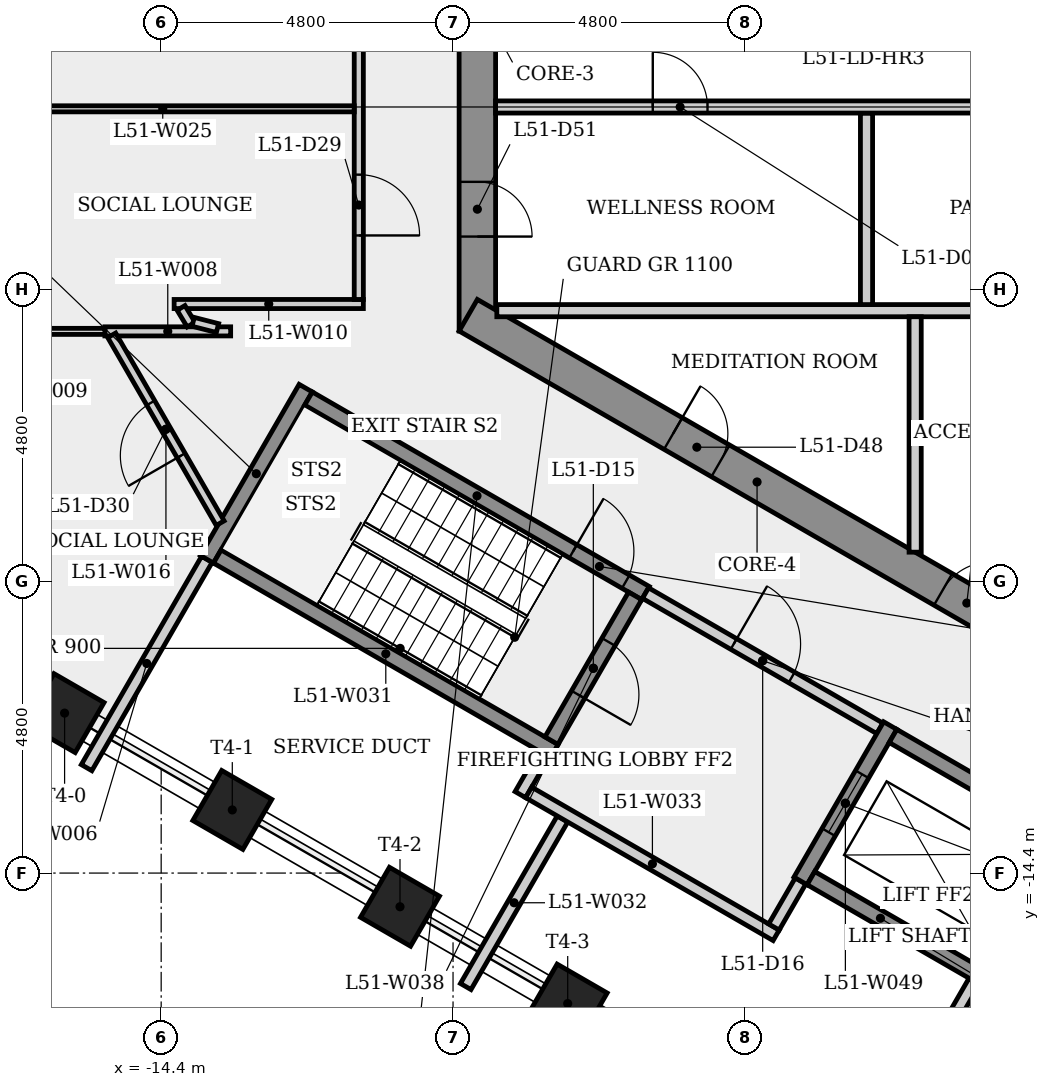
"""IFC4 building model, lengths in metres.
Left out: names, types, materials, properties, quantities, classifications, styles, units other than length and angle.
Written with IfcOpenShell. Run it as: python <this file> out.ifc"""

import sys

from ifc_helpers import new_model, si_unit, direction, frame, frame_2d, origin, origin_2d, place, context, subcontext, project, spatial, rectangle, extrude, element, fill, save


model = new_model("IFC4")
c1 = context("Model", 3, precision=1e-05, world=origin(), true_north=direction((0.0, 1.0)))
c2 = subcontext(c1, "Body", "Model", "MODEL_VIEW")
j1 = project(units=[si_unit("LENGTHUNIT", "METRE"), si_unit("PLANEANGLEUNIT", "RADIAN")], contexts=[c1])
p1 = place(None, origin())
s1 = spatial("IfcSite", under=j1, at=p1, CompositionType="ELEMENT")
p2 = place(p1, origin())
s2 = spatial("IfcBuilding", under=s1, at=p2, CompositionType="ELEMENT")
p3 = place(p2, frame((0.0, 0.0, 190.7)))
s3 = spatial("IfcBuildingStorey", under=s2, at=p3, CompositionType="ELEMENT", Elevation=190.7)
p4 = place(p3, frame((-9.2, 5.485, 0.0), z_axis=(0.0, 0.0, 1.0), x_axis=(0.0, -1.0, 0.0)))
e1 = element("IfcWall", 1, at=p4, inside=s3, PredefinedType="SHEAR", context=c2, shape_type="SweptSolid", body=[
    extrude(rectangle(XDim=10.97, YDim=0.6, at=frame_2d((5.485, 0.0))), origin(), (0.0, 0.0, 1.0), 4.0),
])
p5 = place(p4, frame((8.516, 0.0, 0.0)))
e2 = element("IfcOpeningElement", 2, at=p5, cuts=e1, PredefinedType="OPENING", context=c2, shape_type="SweptSolid", body=[
    extrude(rectangle(XDim=0.9, YDim=2.1, at=frame_2d((0.45, 1.05))), frame((0.0, 0.31, 0.0), z_axis=(0.0, -1.0, 0.0), x_axis=(1.0, 0.0, 0.0)), (0.0, 0.0, 1.0), 0.62),
])
p6 = place(p4, frame((4.685, 0.0, 0.0)))
e3 = element("IfcOpeningElement", 3, at=p6, cuts=e1, PredefinedType="OPENING", context=c2, shape_type="SweptSolid", body=[
    extrude(rectangle(XDim=1.6, YDim=2.1, at=frame_2d((0.8, 1.05))), frame((0.0, 0.31, 0.0), z_axis=(0.0, -1.0, 0.0), x_axis=(1.0, 0.0, 0.0)), (0.0, 0.0, 1.0), 0.62),
])
p7 = place(p3, frame((-9.35, -5.225, 0.0), z_axis=(0.0, 0.0, 1.0), x_axis=(0.866023993627, -0.500002442456, 0.0)))
e4 = element("IfcWall", 4, at=p7, inside=s3, PredefinedType="SHEAR", context=c2, shape_type="SweptSolid", body=[
    extrude(rectangle(XDim=10.97, YDim=0.6, at=frame_2d((5.485, 0.0))), origin(), (0.0, 0.0, 1.0), 4.0),
])
p8 = place(p7, frame((3.891, 0.0, 0.0)))
e5 = element("IfcOpeningElement", 5, at=p8, cuts=e4, PredefinedType="OPENING", context=c2, shape_type="SweptSolid", body=[
    extrude(rectangle(XDim=0.9, YDim=2.1, at=frame_2d((0.45, 1.05))), frame((0.0, 0.31, 0.0), z_axis=(0.0, -1.0, 0.0), x_axis=(1.0, 0.0, 0.0)), (0.0, 0.0, 1.0), 0.62),
])
p9 = place(p7, frame((9.018, 0.0, 0.0)))
e6 = element("IfcOpeningElement", 6, at=p9, cuts=e4, PredefinedType="OPENING", context=c2, shape_type="SweptSolid", body=[
    extrude(rectangle(XDim=0.9, YDim=2.1, at=frame_2d((0.45, 1.05))), frame((0.0, 0.31, 0.0), z_axis=(0.0, -1.0, 0.0), x_axis=(1.0, 0.0, 0.0)), (0.0, 0.0, 1.0), 0.62),
])
for number, where, z_axis, x_axis in (
    (7, (-15.988, -11.769, 0.0), (0.0, 0.0, 1.0), (-0.5, -0.866, 0.0)),
    (8, (-13.23, -13.362, 0.0), (0.0, 0.0, 1.0), (-0.5, -0.866, 0.0)),
    (9, (-10.472, -14.954, 0.0), (0.0, 0.0, 1.0), (-0.5, -0.866, 0.0)),
    (10, (-7.714, -16.546, 0.0), (0.0, 0.0, 1.0), (-0.5, -0.866, 0.0)),
):
    element("IfcColumn", number, at=place(p3, frame(where, z_axis=z_axis, x_axis=x_axis)), inside=s3, PredefinedType="COLUMN", context=c2, shape_type="SweptSolid", body=[
        extrude(rectangle(XDim=0.95, YDim=0.95, at=origin_2d()), origin(), (0.0, 0.0, 1.0), 4.0),
    ])
p10 = place(p3, frame((-15.627, -12.666, 0.0), z_axis=(0.0, 0.0, 1.0), x_axis=(0.499980548326, 0.866036633923, 0.0)))
e11 = element("IfcWall", 11, at=p10, inside=s3, PredefinedType="PLUMBINGWALL", context=c2, shape_type="SweptSolid", body=[
    extrude(rectangle(XDim=3.958, YDim=0.2, at=frame_2d((1.979, 0.0))), origin(), (0.0, 0.0, 1.0), 3.6),
])
p11 = place(p3, frame((-15.326, -5.49, 0.0), z_axis=(0.0, 0.0, 1.0), x_axis=(1.0, 0.0, 0.0)))
e12 = element("IfcWall", 12, at=p11, inside=s3, PredefinedType="PARTITIONING", context=c2, shape_type="SweptSolid", body=[
    extrude(rectangle(XDim=2.069, YDim=0.15, at=frame_2d((1.034, 0.0))), origin(), (0.0, 0.0, 1.0), 3.6),
])
p12 = place(p3, frame((-15.326, -5.49, 0.0), z_axis=(0.0, 0.0, 1.0), x_axis=(-1.0, 0.0, 0.0)))
e13 = element("IfcWall", 13, at=p12, inside=s3, PredefinedType="PARTITIONING", context=c2, shape_type="SweptSolid", body=[
    extrude(rectangle(XDim=2.198, YDim=0.1, at=frame_2d((1.099, 0.0))), origin(), (0.0, 0.0, 1.0), 3.6),
])
p13 = place(p3, frame((-14.187, -5.041, 0.0), z_axis=(0.0, 0.0, 1.0), x_axis=(1.0, 0.0, 0.0)))
e14 = element("IfcWall", 14, at=p13, inside=s3, PredefinedType="PARTITIONING", context=c2, shape_type="SweptSolid", body=[
    extrude(rectangle(XDim=3.112, YDim=0.15, at=frame_2d((1.556, 0.0))), origin(), (0.0, 0.0, 1.0), 3.6),
])
p14 = place(p3, frame((-13.908, -5.379, 0.0), z_axis=(0.0, 0.0, 1.0), x_axis=(-0.516174148431, 0.856483653371, 0.0)))
e15 = element("IfcWall", 15, at=p14, inside=s3, PredefinedType="PARTITIONING", context=c2, shape_type="SweptSolid", body=[
    extrude(rectangle(XDim=0.321, YDim=0.15, at=frame_2d((0.16, 0.0))), origin(), (0.0, 0.0, 1.0), 3.6),
])
p15 = place(p3, frame((-13.648, -9.239, 0.0), z_axis=(0.0, 0.0, 1.0), x_axis=(0.500017246033, 0.866015446554, 0.0)))
e16 = element("IfcWall", 16, at=p15, inside=s3, PredefinedType="SHEAR", context=c2, shape_type="SweptSolid", body=[
    extrude(rectangle(XDim=3.25, YDim=0.25, at=frame_2d((1.625, 0.0))), origin(), (0.0, 0.0, 1.0), 3.6),
])
p16 = place(p3, frame((-13.473, -5.436, 0.0), z_axis=(0.0, 0.0, 1.0), x_axis=(-0.968736704431, 0.248091107232, 0.0)))
e17 = element("IfcWall", 17, at=p16, inside=s3, PredefinedType="PARTITIONING", context=c2, shape_type="SweptSolid", body=[
    extrude(rectangle(XDim=0.413, YDim=0.15, at=frame_2d((0.207, 0.0))), origin(), (0.0, 0.0, 1.0), 3.6),
])
p17 = place(p3, frame((-13.43, -8.645, 0.0), z_axis=(0.0, 0.0, 1.0), x_axis=(-0.499959432603, 0.866048824115, 0.0)))
e18 = element("IfcWall", 18, at=p17, inside=s3, PredefinedType="PARTITIONING", context=c2, shape_type="SweptSolid", body=[
    extrude(rectangle(XDim=3.567, YDim=0.15, at=frame_2d((1.784, 0.0))), origin(), (0.0, 0.0, 1.0), 3.6),
])
p18 = place(p17, frame((1.284, 0.0, 0.0)))
e19 = element("IfcOpeningElement", 19, at=p18, cuts=e18, PredefinedType="OPENING", context=c2, shape_type="SweptSolid", body=[
    extrude(rectangle(XDim=1.0, YDim=2.1, at=frame_2d((0.5, 1.05))), frame((0.0, 0.085, 0.0), z_axis=(0.0, -1.0, 0.0), x_axis=(1.0, 0.0, 0.0)), (0.0, 0.0, 1.0), 0.17),
])
p19 = place(p3, frame((-11.977, -6.595, 0.0), z_axis=(0.0, 0.0, 1.0), x_axis=(0.866025499775, -0.499999833739, 0.0)))
e20 = element("IfcWall", 20, at=p19, inside=s3, PredefinedType="SHEAR", context=c2, shape_type="SweptSolid", body=[
    extrude(rectangle(XDim=6.4, YDim=0.25, at=frame_2d((3.2, 0.0))), origin(), (0.0, 0.0, 1.0), 3.6),
])
p20 = place(p19, frame((5.025, 0.0, 0.0)))
e21 = element("IfcOpeningElement", 21, at=p20, cuts=e20, PredefinedType="OPENING", context=c2, shape_type="SweptSolid", body=[
    extrude(rectangle(XDim=1.0, YDim=2.1, at=frame_2d((0.5, 1.05))), frame((0.0, 0.135, 0.0), z_axis=(0.0, -1.0, 0.0), x_axis=(1.0, 0.0, 0.0)), (0.0, 0.0, 1.0), 0.27),
])
p21 = place(p3, frame((-11.15, 5.565, 0.0), z_axis=(0.0, 0.0, 1.0), x_axis=(0.0, -1.0, 0.0)))
e22 = element("IfcWall", 22, at=p21, inside=s3, PredefinedType="PARTITIONING", context=c2, shape_type="SweptSolid", body=[
    extrude(rectangle(XDim=10.531, YDim=0.15, at=frame_2d((5.266, 0.0))), origin(), (0.0, 0.0, 1.0), 3.6),
])
p22 = place(p21, frame((5.065, 0.0, 0.0)))
e23 = element("IfcOpeningElement", 23, at=p22, cuts=e22, PredefinedType="OPENING", context=c2, shape_type="SweptSolid", body=[
    extrude(rectangle(XDim=1.0, YDim=2.1, at=frame_2d((0.5, 1.05))), frame((0.0, 0.085, 0.0), z_axis=(0.0, -1.0, 0.0), x_axis=(1.0, 0.0, 0.0)), (0.0, 0.0, 1.0), 0.17),
])
p23 = place(p21, frame((8.479, 0.0, 0.0)))
e24 = element("IfcOpeningElement", 24, at=p23, cuts=e22, PredefinedType="OPENING", context=c2, shape_type="SweptSolid", body=[
    extrude(rectangle(XDim=1.0, YDim=2.1, at=frame_2d((0.5, 1.05))), frame((0.0, 0.085, 0.0), z_axis=(0.0, -1.0, 0.0), x_axis=(1.0, 0.0, 0.0)), (0.0, 0.0, 1.0), 0.17),
])
p24 = place(p3, frame((-11.225, -1.83, 0.0), z_axis=(0.0, 0.0, 1.0), x_axis=(-1.0, 0.0, 0.0)))
e25 = element("IfcWall", 25, at=p24, inside=s3, PredefinedType="PARTITIONING", context=c2, shape_type="SweptSolid", body=[
    extrude(rectangle(XDim=6.298, YDim=0.1, at=frame_2d((3.149, 0.0))), origin(), (0.0, 0.0, 1.0), 3.6),
])
p25 = place(p3, frame((-8.88, -5.15, 0.0), z_axis=(0.0, 0.0, 1.0), x_axis=(1.0, 0.0, 0.0)))
e26 = element("IfcWall", 26, at=p25, inside=s3, PredefinedType="PARTITIONING", context=c2, shape_type="SweptSolid", body=[
    extrude(rectangle(XDim=11.205, YDim=0.2, at=frame_2d((5.603, 0.0))), origin(), (0.0, 0.0, 1.0), 3.6),
])
p26 = place(p3, frame((-8.493, -13.11, 0.0), z_axis=(0.0, 0.0, 1.0), x_axis=(0.500067724834, 0.865986299303, 0.0)))
e27 = element("IfcWall", 27, at=p26, inside=s3, PredefinedType="PLUMBINGWALL", context=c2, shape_type="SweptSolid", body=[
    extrude(rectangle(XDim=0.775, YDim=0.2, at=frame_2d((0.388, 0.0))), origin(), (0.0, 0.0, 1.0), 3.6),
])
p27 = place(p3, frame((-7.935, -12.393, 0.0), z_axis=(0.0, 0.0, 1.0), x_axis=(-0.866025499775, 0.499999833739, 0.0)))
e28 = element("IfcWall", 28, at=p27, inside=s3, PredefinedType="SHEAR", context=c2, shape_type="SweptSolid", body=[
    extrude(rectangle(XDim=6.4, YDim=0.25, at=frame_2d((3.2, 0.0))), origin(), (0.0, 0.0, 1.0), 3.6),
])
p28 = place(p3, frame((-7.8, -13.51, 0.0), z_axis=(0.0, 0.0, 1.0), x_axis=(-0.500016846771, -0.866015677078, 0.0)))
e29 = element("IfcWall", 29, at=p28, inside=s3, PredefinedType="PLUMBINGWALL", context=c2, shape_type="SweptSolid", body=[
    extrude(rectangle(XDim=3.183, YDim=0.2, at=frame_2d((1.591, 0.0))), origin(), (0.0, 0.0, 1.0), 3.6),
])
p29 = place(p3, frame((-8.356, -13.073, 0.0), z_axis=(0.0, 0.0, 1.0), x_axis=(0.866038532462, -0.499977259774, 0.0)))
e30 = element("IfcWall", 30, at=p29, inside=s3, PredefinedType="PLUMBINGWALL", context=c2, shape_type="SweptSolid", body=[
    extrude(rectangle(XDim=4.7, YDim=0.2, at=frame_2d((2.35, 0.0))), origin(), (0.0, 0.0, 1.0), 3.6),
])
p30 = place(p3, frame((-6.605, -9.841, 0.0), z_axis=(0.0, 0.0, 1.0), x_axis=(-0.499996545922, -0.866027397988, 0.0)))
e31 = element("IfcWall", 31, at=p30, inside=s3, PredefinedType="SHEAR", context=c2, shape_type="SweptSolid", body=[
    extrude(rectangle(XDim=2.75, YDim=0.25, at=frame_2d((1.375, 0.0))), origin(), (0.0, 0.0, 1.0), 3.6),
])
p31 = place(p30, frame((0.875, 0.0, 0.0)))
e32 = element("IfcOpeningElement", 32, at=p31, cuts=e31, PredefinedType="OPENING", context=c2, shape_type="SweptSolid", body=[
    extrude(rectangle(XDim=1.0, YDim=2.1, at=frame_2d((0.5, 1.05))), frame((0.0, 0.135, 0.0), z_axis=(0.0, -1.0, 0.0), x_axis=(1.0, 0.0, 0.0)), (0.0, 0.0, 1.0), 0.27),
])
p32 = place(p3, frame((-6.435, -9.795, 0.0), z_axis=(0.0, 0.0, 1.0), x_axis=(0.866012907634, -0.500021643343, 0.0)))
e33 = element("IfcWall", 33, at=p32, inside=s3, PredefinedType="PARTITIONING", context=c2, shape_type="SweptSolid", body=[
    extrude(rectangle(XDim=4.45, YDim=0.2, at=frame_2d((2.225, 0.0))), origin(), (0.0, 0.0, 1.0), 3.6),
])
p33 = place(p32, frame((1.675, 0.0, 0.0)))
e34 = element("IfcOpeningElement", 34, at=p33, cuts=e33, PredefinedType="OPENING", context=c2, shape_type="SweptSolid", body=[
    extrude(rectangle(XDim=1.1, YDim=2.1, at=frame_2d((0.55, 1.05))), frame((0.0, 0.11, 0.0), z_axis=(0.0, -1.0, 0.0), x_axis=(1.0, 0.0, 0.0)), (0.0, 0.0, 1.0), 0.22),
])
p34 = place(p3, frame((-3.885, -14.529, 0.0), z_axis=(0.0, 0.0, 1.0), x_axis=(-0.499859285417, -0.866106630146, 0.0)))
e35 = element("IfcWall", 35, at=p34, inside=s3, PredefinedType="PLUMBINGWALL", context=c2, shape_type="SweptSolid", body=[
    extrude(rectangle(XDim=0.875, YDim=0.2, at=frame_2d((0.438, 0.0))), origin(), (0.0, 0.0, 1.0), 3.6),
])
p35 = place(p3, frame((-2.8, -1.9, 0.0), z_axis=(0.0, 0.0, 1.0), x_axis=(0.0, -1.0, 0.0)))
e36 = element("IfcWall", 36, at=p35, inside=s3, PredefinedType="PARTITIONING", context=c2, shape_type="SweptSolid", body=[
    extrude(rectangle(XDim=3.15, YDim=0.2, at=frame_2d((1.575, 0.0))), origin(), (0.0, 0.0, 1.0), 3.6),
])
p36 = place(p3, frame((-8.9, -1.8, 0.0), z_axis=(0.0, 0.0, 1.0), x_axis=(1.0, 0.0, 0.0)))
e37 = element("IfcWall", 37, at=p36, inside=s3, PredefinedType="PARTITIONING", context=c2, shape_type="SweptSolid", body=[
    extrude(rectangle(XDim=11.225, YDim=0.2, at=frame_2d((5.613, 0.0))), origin(), (0.0, 0.0, 1.0), 3.6),
])
p37 = place(p36, frame((2.585, 0.0, 0.0)))
e38 = element("IfcOpeningElement", 38, at=p37, cuts=e37, PredefinedType="OPENING", context=c2, shape_type="SweptSolid", body=[
    extrude(rectangle(XDim=0.9, YDim=2.1, at=frame_2d((0.45, 1.05))), frame((0.0, 0.11, 0.0), z_axis=(0.0, -1.0, 0.0), x_axis=(1.0, 0.0, 0.0)), (0.0, 0.0, 1.0), 0.22),
])
p38 = place(p36, frame((8.387, 0.0, 0.0)))
e39 = element("IfcOpeningElement", 39, at=p38, cuts=e37, PredefinedType="OPENING", context=c2, shape_type="SweptSolid", body=[
    extrude(rectangle(XDim=0.9, YDim=2.1, at=frame_2d((0.45, 1.05))), frame((0.0, 0.11, 0.0), z_axis=(0.0, -1.0, 0.0), x_axis=(1.0, 0.0, 0.0)), (0.0, 0.0, 1.0), 0.22),
])
p39 = place(p3, frame((-2.41, -11.974, 0.0), z_axis=(0.0, 0.0, 1.0), x_axis=(-0.500001826776, -0.866024349092, 0.0)))
e40 = element("IfcWall", 40, at=p39, inside=s3, PredefinedType="SHEAR", context=c2, shape_type="SweptSolid", body=[
    extrude(rectangle(XDim=2.95, YDim=0.25, at=frame_2d((1.475, 0.0))), origin(), (0.0, 0.0, 1.0), 3.6),
])
p40 = place(p39, frame((0.925, 0.0, 0.0)))
e41 = element("IfcOpeningElement", 41, at=p40, cuts=e40, PredefinedType="OPENING", context=c2, shape_type="SweptSolid", body=[
    extrude(rectangle(XDim=1.1, YDim=2.1, at=frame_2d((0.55, 1.05))), frame((0.0, 0.135, 0.0), z_axis=(0.0, -1.0, 0.0), x_axis=(1.0, 0.0, 0.0)), (0.0, 0.0, 1.0), 0.27),
])
p41 = place(p3, frame((-2.364, -12.145, 0.0), z_axis=(0.0, 0.0, 1.0), x_axis=(0.866040211805, -0.499974350878, 0.0)))
e42 = element("IfcWall", 42, at=p41, inside=s3, PredefinedType="SHEAR", context=c2, shape_type="SweptSolid", body=[
    extrude(rectangle(XDim=3.3, YDim=0.25, at=frame_2d((1.65, 0.0))), origin(), (0.0, 0.0, 1.0), 3.6),
])
p42 = place(p3, frame((-2.0, -5.25, 0.0), z_axis=(0.0, 0.0, 1.0), x_axis=(0.0, -1.0, 0.0)))
e43 = element("IfcWall", 43, at=p42, inside=s3, PredefinedType="PARTITIONING", context=c2, shape_type="SweptSolid", body=[
    extrude(rectangle(XDim=3.872, YDim=0.2, at=frame_2d((1.936, 0.0))), origin(), (0.0, 0.0, 1.0), 3.6),
])
p43 = place(p3, frame((-1.027, -16.179, 0.0), z_axis=(0.0, 0.0, 1.0), x_axis=(-0.500011993549, -0.866018479195, 0.0)))
e44 = element("IfcWall", 44, at=p43, inside=s3, PredefinedType="PLUMBINGWALL", context=c2, shape_type="SweptSolid", body=[
    extrude(rectangle(XDim=4.258, YDim=0.2, at=frame_2d((2.129, 0.0))), origin(), (0.0, 0.0, 1.0), 3.6),
])
p44 = place(p3, frame((-0.856, -16.133, 0.0), z_axis=(0.0, 0.0, 1.0), x_axis=(-0.866021716278, 0.500006386895, 0.0)))
e45 = element("IfcWall", 45, at=p44, inside=s3, PredefinedType="SHEAR", context=c2, shape_type="SweptSolid", body=[
    extrude(rectangle(XDim=3.3, YDim=0.25, at=frame_2d((1.65, 0.0))), origin(), (0.0, 0.0, 1.0), 3.6),
])
p45 = place(p37, origin())
e46 = element("IfcDoor", 46, at=p45, inside=s3, OperationType="SINGLE_SWING_LEFT", PredefinedType="DOOR", context=c2, shape_type="SweptSolid", body=[
    extrude(rectangle(XDim=0.9, YDim=2.1, at=frame_2d((0.45, 1.05))), frame((0.0, 0.025, 0.0), z_axis=(0.0, -1.0, 0.0), x_axis=(1.0, 0.0, 0.0)), (0.0, 0.0, 1.0), 0.05),
])
fill(e38, e46)
p46 = place(p20, origin())
e47 = element("IfcDoor", 47, at=p46, inside=s3, OperationType="SINGLE_SWING_LEFT", PredefinedType="DOOR", context=c2, shape_type="SweptSolid", body=[
    extrude(rectangle(XDim=1.0, YDim=2.1, at=frame_2d((0.5, 1.05))), frame((0.0, 0.025, 0.0), z_axis=(0.0, -1.0, 0.0), x_axis=(1.0, 0.0, 0.0)), (0.0, 0.0, 1.0), 0.05),
])
fill(e21, e47)
p47 = place(p31, origin())
e48 = element("IfcDoor", 48, at=p47, inside=s3, OperationType="SINGLE_SWING_RIGHT", PredefinedType="DOOR", context=c2, shape_type="SweptSolid", body=[
    extrude(rectangle(XDim=1.0, YDim=2.1, at=frame_2d((0.5, 1.05))), frame((0.0, 0.025, 0.0), z_axis=(0.0, -1.0, 0.0), x_axis=(1.0, 0.0, 0.0)), (0.0, 0.0, 1.0), 0.05),
])
fill(e32, e48)
p48 = place(p33, origin())
e49 = element("IfcDoor", 49, at=p48, inside=s3, OperationType="SINGLE_SWING_LEFT", PredefinedType="DOOR", context=c2, shape_type="SweptSolid", body=[
    extrude(rectangle(XDim=1.1, YDim=2.1, at=frame_2d((0.55, 1.05))), frame((0.0, 0.025, 0.0), z_axis=(0.0, -1.0, 0.0), x_axis=(1.0, 0.0, 0.0)), (0.0, 0.0, 1.0), 0.05),
])
fill(e34, e49)
p49 = place(p40, origin())
e50 = element("IfcDoor", 50, at=p49, inside=s3, OperationType="SLIDING_TO_LEFT", PredefinedType="DOOR", context=c2, shape_type="SweptSolid", body=[
    extrude(rectangle(XDim=1.1, YDim=2.1, at=frame_2d((0.55, 1.05))), frame((0.0, 0.025, 0.0), z_axis=(0.0, -1.0, 0.0), x_axis=(1.0, 0.0, 0.0)), (0.0, 0.0, 1.0), 0.05),
])
fill(e41, e50)
p50 = place(p23, origin())
e51 = element("IfcDoor", 51, at=p50, inside=s3, OperationType="SINGLE_SWING_RIGHT", PredefinedType="DOOR", context=c2, shape_type="SweptSolid", body=[
    extrude(rectangle(XDim=1.0, YDim=2.1, at=frame_2d((0.5, 1.05))), frame((0.0, 0.025, 0.0), z_axis=(0.0, -1.0, 0.0), x_axis=(1.0, 0.0, 0.0)), (0.0, 0.0, 1.0), 0.05),
])
fill(e24, e51)
p51 = place(p18, origin())
e52 = element("IfcDoor", 52, at=p51, inside=s3, OperationType="SINGLE_SWING_LEFT", PredefinedType="DOOR", context=c2, shape_type="SweptSolid", body=[
    extrude(rectangle(XDim=1.0, YDim=2.1, at=frame_2d((0.5, 1.05))), frame((0.0, 0.025, 0.0), z_axis=(0.0, -1.0, 0.0), x_axis=(1.0, 0.0, 0.0)), (0.0, 0.0, 1.0), 0.05),
])
fill(e19, e52)
p52 = place(p8, origin())
e53 = element("IfcDoor", 53, at=p52, inside=s3, OperationType="SINGLE_SWING_LEFT", PredefinedType="DOOR", context=c2, shape_type="SweptSolid", body=[
    extrude(rectangle(XDim=0.9, YDim=2.1, at=frame_2d((0.45, 1.05))), frame((0.0, 0.025, 0.0), z_axis=(0.0, -1.0, 0.0), x_axis=(1.0, 0.0, 0.0)), (0.0, 0.0, 1.0), 0.05),
])
fill(e5, e53)
p53 = place(p9, origin())
e54 = element("IfcDoor", 54, at=p53, inside=s3, OperationType="SINGLE_SWING_RIGHT", PredefinedType="DOOR", context=c2, shape_type="SweptSolid", body=[
    extrude(rectangle(XDim=0.9, YDim=2.1, at=frame_2d((0.45, 1.05))), frame((0.0, 0.025, 0.0), z_axis=(0.0, -1.0, 0.0), x_axis=(1.0, 0.0, 0.0)), (0.0, 0.0, 1.0), 0.05),
])
fill(e6, e54)
p54 = place(p5, origin())
e55 = element("IfcDoor", 55, at=p54, inside=s3, OperationType="SINGLE_SWING_RIGHT", PredefinedType="DOOR", context=c2, shape_type="SweptSolid", body=[
    extrude(rectangle(XDim=0.9, YDim=2.1, at=frame_2d((0.45, 1.05))), frame((0.0, 0.025, 0.0), z_axis=(0.0, -1.0, 0.0), x_axis=(1.0, 0.0, 0.0)), (0.0, 0.0, 1.0), 0.05),
])
fill(e2, e55)
save(model, sys.argv[1])
